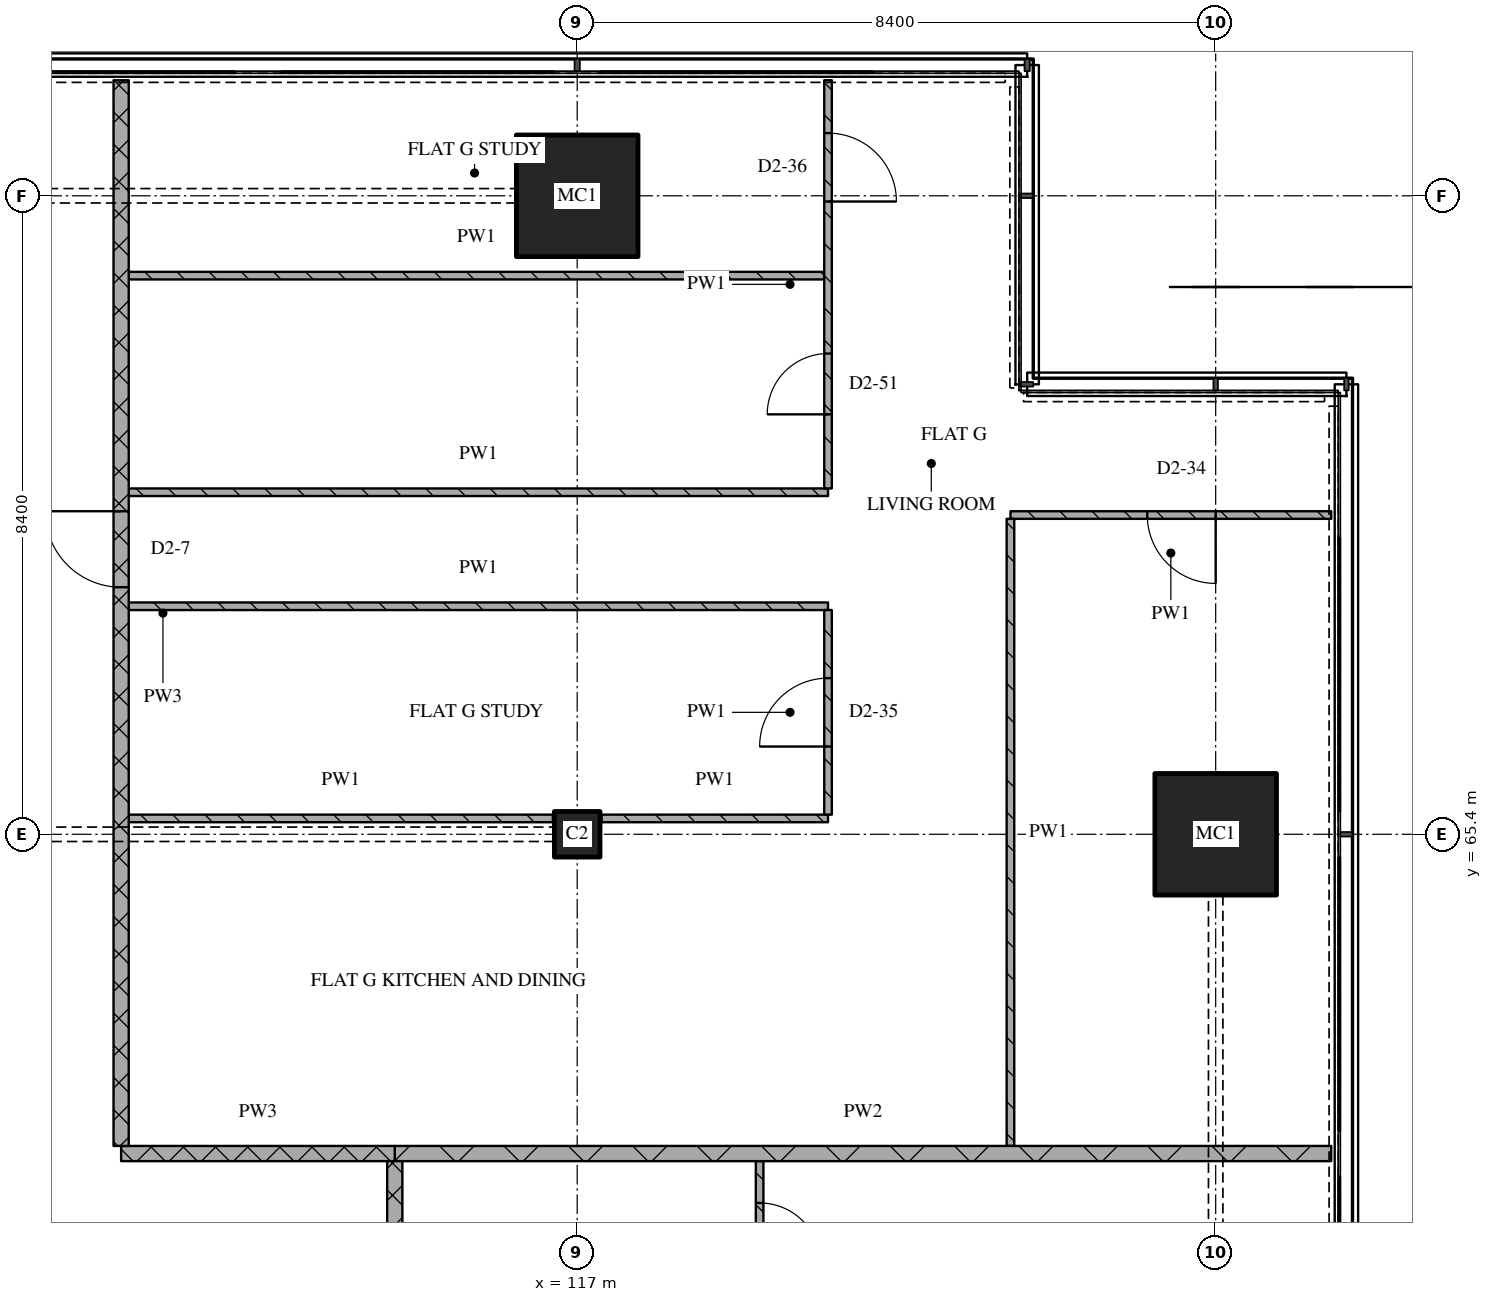
"""IFC4 building model, lengths in metres.
Left out: names, types, materials, properties, quantities, classifications, styles, units other than length and angle.
Written with IfcOpenShell. Run it as: python <this file> out.ifc"""

import sys

from ifc_helpers import new_model, si_unit, direction, frame, frame_2d, origin, origin_2d, place, context, subcontext, project, spatial, rectangle, extrude, element, fill, save


model = new_model("IFC4")
c1 = context("Model", 3, precision=1e-05, world=origin(), true_north=direction((0.0, 1.0)))
c2 = subcontext(c1, "Body", "Model", "MODEL_VIEW")
j1 = project(units=[si_unit("LENGTHUNIT", "METRE"), si_unit("PLANEANGLEUNIT", "RADIAN")], contexts=[c1])
p1 = place(None, origin())
s1 = spatial("IfcSite", under=j1, at=p1, CompositionType="ELEMENT")
p2 = place(p1, origin())
s2 = spatial("IfcBuilding", under=s1, at=p2, CompositionType="ELEMENT")
p3 = place(p2, frame((0.0, 0.0, 223.5)))
s3 = spatial("IfcBuildingStorey", under=s2, at=p3, CompositionType="ELEMENT", Elevation=223.5)
p4 = place(p3, frame((117.0, 65.4, 0.0), z_axis=(0.0, 0.0, 1.0), x_axis=(1.0, 0.0, 0.0)))
e1 = element("IfcColumn", 1, at=p4, inside=s3, PredefinedType="COLUMN", context=c2, shape_type="SweptSolid", body=[
    extrude(rectangle(XDim=0.6, YDim=0.6, at=origin_2d()), origin(), (0.0, 0.0, 1.0), 3.6),
])
for number, where, z_axis, x_axis in (
    (2, (117.0, 73.8, 0.0), (0.0, 0.0, 1.0), (1.0, 0.0, 0.0)),
    (3, (125.4, 65.4, 0.0), (0.0, 0.0, 1.0), (1.0, 0.0, 0.0)),
):
    element("IfcColumn", number, at=place(p3, frame(where, z_axis=z_axis, x_axis=x_axis)), inside=s3, PredefinedType="COLUMN", context=c2, shape_type="SweptSolid", body=[
        extrude(rectangle(XDim=1.6, YDim=1.6, at=origin_2d()), origin(), (0.0, 0.0, 1.0), 3.6),
    ])
p5 = place(p3, frame((111.0, 61.2, 0.0), z_axis=(0.0, 0.0, 1.0), x_axis=(1.0, 0.0, 0.0)))
e4 = element("IfcWall", 4, at=p5, inside=s3, PredefinedType="PARTITIONING", context=c2, shape_type="SweptSolid", body=[
    extrude(rectangle(XDim=3.6, YDim=0.2, at=frame_2d((1.8, 0.0))), origin(), (0.0, 0.0, 1.0), 3.32),
])
p6 = place(p3, frame((114.6, 61.2, 0.0), z_axis=(0.0, 0.0, 1.0), x_axis=(1.0, 0.0, 0.0)))
e5 = element("IfcWall", 5, at=p6, inside=s3, PredefinedType="PARTITIONING", context=c2, shape_type="SweptSolid", body=[
    extrude(rectangle(XDim=12.32, YDim=0.2, at=frame_2d((6.16, 0.0))), origin(), (0.0, 0.0, 1.0), 3.32),
])
p7 = place(p3, frame((111.1, 65.609, 0.0), z_axis=(0.0, 0.0, 1.0), x_axis=(1.0, 0.0, 0.0)))
e6 = element("IfcWall", 6, at=p7, inside=s3, PredefinedType="PARTITIONING", context=c2, shape_type="SweptSolid", body=[
    extrude(rectangle(XDim=5.58, YDim=0.1, at=frame_2d((2.79, 0.0))), origin(), (0.0, 0.0, 1.0), 3.32),
])
p8 = place(p3, frame((117.32, 65.609, 0.0), z_axis=(0.0, 0.0, 1.0), x_axis=(1.0, 0.0, 0.0)))
e7 = element("IfcWall", 7, at=p8, inside=s3, PredefinedType="PARTITIONING", context=c2, shape_type="SweptSolid", body=[
    extrude(rectangle(XDim=2.98, YDim=0.1, at=frame_2d((1.49, 0.0))), origin(), (0.0, 0.0, 1.0), 3.32),
])
p9 = place(p3, frame((111.1, 68.4, 0.0), z_axis=(0.0, 0.0, 1.0), x_axis=(1.0, 0.0, 0.0)))
e8 = element("IfcWall", 8, at=p9, inside=s3, PredefinedType="PARTITIONING", context=c2, shape_type="SweptSolid", body=[
    extrude(rectangle(XDim=9.2, YDim=0.1, at=frame_2d((4.6, 0.0))), origin(), (0.0, 0.0, 1.0), 3.32),
])
p10 = place(p3, frame((126.92, 69.6, 0.0), z_axis=(0.0, 0.0, 1.0), x_axis=(-1.0, 0.0, 0.0)))
e9 = element("IfcWall", 9, at=p10, inside=s3, PredefinedType="PARTITIONING", context=c2, shape_type="SweptSolid", body=[
    extrude(rectangle(XDim=4.22, YDim=0.1, at=frame_2d((2.11, 0.0))), origin(), (0.0, 0.0, 1.0), 3.32),
])
p11 = place(p10, frame((1.52, 0.0, 0.0)))
e10 = element("IfcOpeningElement", 10, at=p11, cuts=e9, PredefinedType="OPENING", context=c2, shape_type="SweptSolid", body=[
    extrude(rectangle(XDim=0.9, YDim=2.1, at=frame_2d((0.45, 1.05))), frame((0.0, 0.06, 0.0), z_axis=(0.0, -1.0, 0.0), x_axis=(1.0, 0.0, 0.0)), (0.0, 0.0, 1.0), 0.12),
])
p12 = place(p3, frame((111.1, 69.9, 0.0), z_axis=(0.0, 0.0, 1.0), x_axis=(1.0, 0.0, 0.0)))
e11 = element("IfcWall", 11, at=p12, inside=s3, PredefinedType="PARTITIONING", context=c2, shape_type="SweptSolid", body=[
    extrude(rectangle(XDim=9.2, YDim=0.1, at=frame_2d((4.6, 0.0))), origin(), (0.0, 0.0, 1.0), 3.32),
])
p13 = place(p3, frame((111.1, 72.75, 0.0), z_axis=(0.0, 0.0, 1.0), x_axis=(1.0, 0.0, 0.0)))
e12 = element("IfcWall", 12, at=p13, inside=s3, PredefinedType="PARTITIONING", context=c2, shape_type="SweptSolid", body=[
    extrude(rectangle(XDim=9.15, YDim=0.1, at=frame_2d((4.575, 0.0))), origin(), (0.0, 0.0, 1.0), 3.32),
])
p14 = place(p3, frame((111.0, 75.32, 0.0), z_axis=(0.0, 0.0, 1.0), x_axis=(0.0, -1.0, 0.0)))
e13 = element("IfcWall", 13, at=p14, inside=s3, PredefinedType="PARTITIONING", context=c2, shape_type="SweptSolid", body=[
    extrude(rectangle(XDim=14.02, YDim=0.2, at=frame_2d((7.01, 0.0))), origin(), (0.0, 0.0, 1.0), 3.32),
])
p15 = place(p14, frame((5.67, 0.0, 0.0)))
e14 = element("IfcOpeningElement", 14, at=p15, cuts=e13, PredefinedType="OPENING", context=c2, shape_type="SweptSolid", body=[
    extrude(rectangle(XDim=1.0, YDim=2.1, at=frame_2d((0.5, 1.05))), frame((0.0, 0.11, 0.0), z_axis=(0.0, -1.0, 0.0), x_axis=(1.0, 0.0, 0.0)), (0.0, 0.0, 1.0), 0.22),
])
p16 = place(p3, frame((114.6, 61.1, 0.0), z_axis=(0.0, 0.0, 1.0), x_axis=(0.0, -1.0, 0.0)))
e15 = element("IfcWall", 15, at=p16, inside=s3, PredefinedType="PARTITIONING", context=c2, shape_type="SweptSolid", body=[
    extrude(rectangle(XDim=17.8, YDim=0.2, at=frame_2d((8.9, 0.0))), origin(), (0.0, 0.0, 1.0), 3.32),
])
p17 = place(p3, frame((119.4, 54.65, 0.0), z_axis=(0.0, 0.0, 1.0), x_axis=(0.0, 1.0, 0.0)))
e16 = element("IfcWall", 16, at=p17, inside=s3, PredefinedType="PARTITIONING", context=c2, shape_type="SweptSolid", body=[
    extrude(rectangle(XDim=6.45, YDim=0.1, at=frame_2d((3.225, 0.0))), origin(), (0.0, 0.0, 1.0), 3.32),
])
p18 = place(p17, frame((1.8, 0.0, 0.0)))
e17 = element("IfcOpeningElement", 17, at=p18, cuts=e16, PredefinedType="OPENING", context=c2, shape_type="SweptSolid", body=[
    extrude(rectangle(XDim=0.8, YDim=2.1, at=frame_2d((0.4, 1.05))), frame((0.0, 0.06, 0.0), z_axis=(0.0, -1.0, 0.0), x_axis=(1.0, 0.0, 0.0)), (0.0, 0.0, 1.0), 0.12),
])
p19 = place(p17, frame((5.1, 0.0, 0.0)))
e18 = element("IfcOpeningElement", 18, at=p19, cuts=e16, PredefinedType="OPENING", context=c2, shape_type="SweptSolid", body=[
    extrude(rectangle(XDim=0.8, YDim=2.1, at=frame_2d((0.4, 1.05))), frame((0.0, 0.06, 0.0), z_axis=(0.0, -1.0, 0.0), x_axis=(1.0, 0.0, 0.0)), (0.0, 0.0, 1.0), 0.12),
])
p20 = place(p3, frame((120.3, 65.659, 0.0), z_axis=(0.0, 0.0, 1.0), x_axis=(0.0, 1.0, 0.0)))
e19 = element("IfcWall", 19, at=p20, inside=s3, PredefinedType="PARTITIONING", context=c2, shape_type="SweptSolid", body=[
    extrude(rectangle(XDim=2.691, YDim=0.1, at=frame_2d((1.346, 0.0))), origin(), (0.0, 0.0, 1.0), 3.32),
])
p21 = place(p20, frame((0.896, 0.0, 0.0)))
e20 = element("IfcOpeningElement", 20, at=p21, cuts=e19, PredefinedType="OPENING", context=c2, shape_type="SweptSolid", body=[
    extrude(rectangle(XDim=0.9, YDim=2.1, at=frame_2d((0.45, 1.05))), frame((0.0, 0.06, 0.0), z_axis=(0.0, -1.0, 0.0), x_axis=(1.0, 0.0, 0.0)), (0.0, 0.0, 1.0), 0.12),
])
p22 = place(p3, frame((120.3, 69.95, 0.0), z_axis=(0.0, 0.0, 1.0), x_axis=(0.0, 1.0, 0.0)))
e21 = element("IfcWall", 21, at=p22, inside=s3, PredefinedType="PARTITIONING", context=c2, shape_type="SweptSolid", body=[
    extrude(rectangle(XDim=5.37, YDim=0.1, at=frame_2d((2.685, 0.0))), origin(), (0.0, 0.0, 1.0), 3.32),
])
p23 = place(p22, frame((0.975, 0.0, 0.0)))
e22 = element("IfcOpeningElement", 22, at=p23, cuts=e21, PredefinedType="OPENING", context=c2, shape_type="SweptSolid", body=[
    extrude(rectangle(XDim=0.8, YDim=2.1, at=frame_2d((0.4, 1.05))), frame((0.0, 0.06, 0.0), z_axis=(0.0, -1.0, 0.0), x_axis=(1.0, 0.0, 0.0)), (0.0, 0.0, 1.0), 0.12),
])
p24 = place(p22, frame((3.775, 0.0, 0.0)))
e23 = element("IfcOpeningElement", 23, at=p24, cuts=e21, PredefinedType="OPENING", context=c2, shape_type="SweptSolid", body=[
    extrude(rectangle(XDim=0.9, YDim=2.1, at=frame_2d((0.45, 1.05))), frame((0.0, 0.06, 0.0), z_axis=(0.0, -1.0, 0.0), x_axis=(1.0, 0.0, 0.0)), (0.0, 0.0, 1.0), 0.12),
])
p25 = place(p3, frame((122.7, 69.55, 0.0), z_axis=(0.0, 0.0, 1.0), x_axis=(0.0, -1.0, 0.0)))
e24 = element("IfcWall", 24, at=p25, inside=s3, PredefinedType="PARTITIONING", context=c2, shape_type="SweptSolid", body=[
    extrude(rectangle(XDim=8.25, YDim=0.1, at=frame_2d((4.125, 0.0))), origin(), (0.0, 0.0, 1.0), 3.32),
])
p26 = place(p11, origin())
e25 = element("IfcDoor", 25, at=p26, inside=s3, OperationType="SINGLE_SWING_LEFT", PredefinedType="DOOR", context=c2, shape_type="SweptSolid", body=[
    extrude(rectangle(XDim=0.9, YDim=2.1, at=frame_2d((0.45, 1.05))), frame((0.0, 0.025, 0.0), z_axis=(0.0, -1.0, 0.0), x_axis=(1.0, 0.0, 0.0)), (0.0, 0.0, 1.0), 0.05),
])
fill(e10, e25)
p27 = place(p15, origin())
e26 = element("IfcDoor", 26, at=p27, inside=s3, OperationType="SINGLE_SWING_RIGHT", PredefinedType="DOOR", context=c2, shape_type="SweptSolid", body=[
    extrude(rectangle(XDim=1.0, YDim=2.1, at=frame_2d((0.5, 1.05))), frame((0.0, 0.025, 0.0), z_axis=(0.0, -1.0, 0.0), x_axis=(1.0, 0.0, 0.0)), (0.0, 0.0, 1.0), 0.05),
])
fill(e14, e26)
p28 = place(p19, origin())
e27 = element("IfcDoor", 27, at=p28, inside=s3, OperationType="SINGLE_SWING_RIGHT", PredefinedType="DOOR", context=c2, shape_type="SweptSolid", body=[
    extrude(rectangle(XDim=0.8, YDim=2.1, at=frame_2d((0.4, 1.05))), frame((0.0, 0.025, 0.0), z_axis=(0.0, -1.0, 0.0), x_axis=(1.0, 0.0, 0.0)), (0.0, 0.0, 1.0), 0.05),
])
fill(e18, e27)
p29 = place(p21, origin())
e28 = element("IfcDoor", 28, at=p29, inside=s3, OperationType="SINGLE_SWING_LEFT", PredefinedType="DOOR", context=c2, shape_type="SweptSolid", body=[
    extrude(rectangle(XDim=0.9, YDim=2.1, at=frame_2d((0.45, 1.05))), frame((0.0, 0.025, 0.0), z_axis=(0.0, -1.0, 0.0), x_axis=(1.0, 0.0, 0.0)), (0.0, 0.0, 1.0), 0.05),
])
fill(e20, e28)
p30 = place(p23, origin())
e29 = element("IfcDoor", 29, at=p30, inside=s3, OperationType="SINGLE_SWING_LEFT", PredefinedType="DOOR", context=c2, shape_type="SweptSolid", body=[
    extrude(rectangle(XDim=0.8, YDim=2.1, at=frame_2d((0.4, 1.05))), frame((0.0, 0.025, 0.0), z_axis=(0.0, -1.0, 0.0), x_axis=(1.0, 0.0, 0.0)), (0.0, 0.0, 1.0), 0.05),
])
fill(e22, e29)
p31 = place(p24, origin())
e30 = element("IfcDoor", 30, at=p31, inside=s3, OperationType="SINGLE_SWING_RIGHT", PredefinedType="DOOR", context=c2, shape_type="SweptSolid", body=[
    extrude(rectangle(XDim=0.9, YDim=2.1, at=frame_2d((0.45, 1.05))), frame((0.0, 0.025, 0.0), z_axis=(0.0, -1.0, 0.0), x_axis=(1.0, 0.0, 0.0)), (0.0, 0.0, 1.0), 0.05),
])
fill(e23, e30)
save(model, sys.argv[1])
